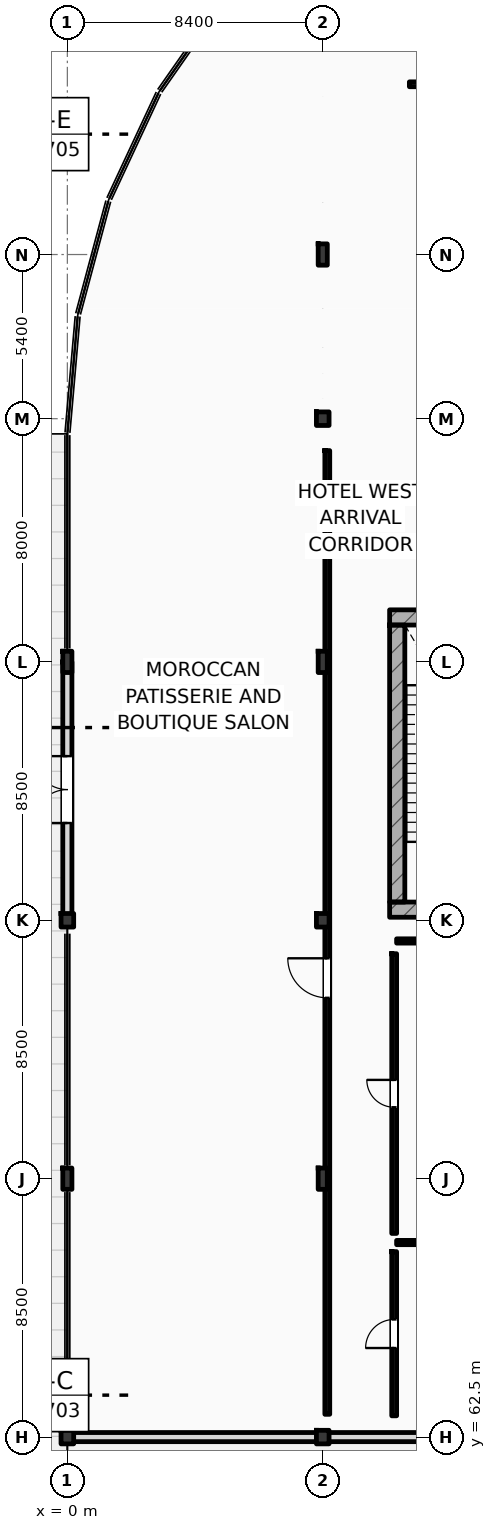
"""IFC4 building model, lengths in metres.
Left out: names, types, materials, properties, quantities, classifications, styles, units other than length and angle.
Written with IfcOpenShell. Run it as: python <this file> out.ifc"""

import sys

from ifc_helpers import new_model, si_unit, direction, frame, frame_2d, origin, origin_2d, place, context, subcontext, project, spatial, rectangle, i_section, extrude, element, fill, save


model = new_model("IFC4")
c1 = context("Model", 3, precision=1e-05, world=origin(), true_north=direction((0.0, 1.0)))
c2 = subcontext(c1, "Body", "Model", "MODEL_VIEW")
j1 = project(units=[si_unit("LENGTHUNIT", "METRE"), si_unit("PLANEANGLEUNIT", "RADIAN")], contexts=[c1])
p1 = place(None, origin())
s1 = spatial("IfcSite", under=j1, at=p1, CompositionType="ELEMENT")
p2 = place(p1, origin())
s2 = spatial("IfcBuilding", under=s1, at=p2, CompositionType="ELEMENT")
p3 = place(p2, origin())
s3 = spatial("IfcBuildingStorey", under=s2, at=p3, CompositionType="ELEMENT", Elevation=0.0)
p4 = place(p3, frame((0.0, 62.5, 0.0), z_axis=(0.0, 0.0, 1.0), x_axis=(1.0, 0.0, 0.0)))
e1 = element("IfcColumn", 1, at=p4, inside=s3, PredefinedType="COLUMN", context=c2, shape_type="SweptSolid", body=[
    extrude(i_section(OverallWidth=0.416, OverallDepth=0.446, WebThickness=0.036, FlangeThickness=0.048, FilletRadius=0.015, at=origin_2d()), origin(), (0.0, 0.0, 1.0), 6.0),
])
p5 = place(p3, frame((0.0, 71.0, 0.0), z_axis=(0.0, 0.0, 1.0), x_axis=(1.0, 0.0, 0.0)))
e2 = element("IfcColumn", 2, at=p5, inside=s3, PredefinedType="COLUMN", context=c2, shape_type="SweptSolid", body=[
    extrude(i_section(OverallWidth=0.3, OverallDepth=0.7, WebThickness=0.017, FlangeThickness=0.032, FilletRadius=0.027, at=origin_2d()), origin(), (0.0, 0.0, 1.0), 6.0),
])
p6 = place(p3, frame((0.0, 79.5, 0.0), z_axis=(0.0, 0.0, 1.0), x_axis=(1.0, 0.0, 0.0)))
e3 = element("IfcColumn", 3, at=p6, inside=s3, PredefinedType="COLUMN", context=c2, shape_type="SweptSolid", body=[
    extrude(i_section(OverallWidth=0.416, OverallDepth=0.446, WebThickness=0.036, FlangeThickness=0.048, FilletRadius=0.015, at=origin_2d()), origin(), (0.0, 0.0, 1.0), 6.0),
])
p7 = place(p3, frame((0.0, 88.0, 0.0), z_axis=(0.0, 0.0, 1.0), x_axis=(1.0, 0.0, 0.0)))
e4 = element("IfcColumn", 4, at=p7, inside=s3, PredefinedType="COLUMN", context=c2, shape_type="SweptSolid", body=[
    extrude(i_section(OverallWidth=0.3, OverallDepth=0.7, WebThickness=0.017, FlangeThickness=0.032, FilletRadius=0.027, at=origin_2d()), origin(), (0.0, 0.0, 1.0), 6.0),
])
p8 = place(p3, frame((8.4, 62.5, 0.0), z_axis=(0.0, 0.0, 1.0), x_axis=(1.0, 0.0, 0.0)))
e5 = element("IfcColumn", 5, at=p8, inside=s3, PredefinedType="COLUMN", context=c2, shape_type="SweptSolid", body=[
    extrude(i_section(OverallWidth=0.416, OverallDepth=0.446, WebThickness=0.036, FlangeThickness=0.048, FilletRadius=0.015, at=origin_2d()), origin(), (0.0, 0.0, 1.0), 6.0),
])
p9 = place(p3, frame((8.4, 71.0, 0.0), z_axis=(0.0, 0.0, 1.0), x_axis=(1.0, 0.0, 0.0)))
e6 = element("IfcColumn", 6, at=p9, inside=s3, PredefinedType="COLUMN", context=c2, shape_type="SweptSolid", body=[
    extrude(i_section(OverallWidth=0.3, OverallDepth=0.7, WebThickness=0.017, FlangeThickness=0.032, FilletRadius=0.027, at=origin_2d()), origin(), (0.0, 0.0, 1.0), 6.0),
])
p10 = place(p3, frame((8.4, 79.5, 0.0), z_axis=(0.0, 0.0, 1.0), x_axis=(1.0, 0.0, 0.0)))
e7 = element("IfcColumn", 7, at=p10, inside=s3, PredefinedType="COLUMN", context=c2, shape_type="SweptSolid", body=[
    extrude(i_section(OverallWidth=0.416, OverallDepth=0.446, WebThickness=0.036, FlangeThickness=0.048, FilletRadius=0.015, at=origin_2d()), origin(), (0.0, 0.0, 1.0), 6.0),
])
p11 = place(p3, frame((8.4, 88.0, 0.0), z_axis=(0.0, 0.0, 1.0), x_axis=(1.0, 0.0, 0.0)))
e8 = element("IfcColumn", 8, at=p11, inside=s3, PredefinedType="COLUMN", context=c2, shape_type="SweptSolid", body=[
    extrude(i_section(OverallWidth=0.3, OverallDepth=0.7, WebThickness=0.017, FlangeThickness=0.032, FilletRadius=0.027, at=origin_2d()), origin(), (0.0, 0.0, 1.0), 6.0),
])
p12 = place(p3, frame((8.4, 96.0, 0.0), z_axis=(0.0, 0.0, 1.0), x_axis=(1.0, 0.0, 0.0)))
e9 = element("IfcColumn", 9, at=p12, inside=s3, PredefinedType="COLUMN", context=c2, shape_type="SweptSolid", body=[
    extrude(i_section(OverallWidth=0.416, OverallDepth=0.446, WebThickness=0.036, FlangeThickness=0.048, FilletRadius=0.015, at=origin_2d()), origin(), (0.0, 0.0, 1.0), 6.0),
])
p13 = place(p3, frame((8.4, 101.4, 0.0), z_axis=(0.0, 0.0, 1.0), x_axis=(1.0, 0.0, 0.0)))
e10 = element("IfcColumn", 10, at=p13, inside=s3, PredefinedType="COLUMN", context=c2, shape_type="SweptSolid", body=[
    extrude(i_section(OverallWidth=0.3, OverallDepth=0.7, WebThickness=0.017, FlangeThickness=0.032, FilletRadius=0.027, at=origin_2d()), origin(), (0.0, 0.0, 1.0), 6.0),
])
for number, where, z_axis, x_axis in (
    (11, (10.6, 89.462, 0.0), (0.0, 0.0, 1.0), (1.0, 0.0, 0.0)),
    (12, (10.6, 79.85, 0.0), (0.0, 0.0, 1.0), (1.0, 0.0, 0.0)),
):
    element("IfcWall", number, at=place(p3, frame(where, z_axis=z_axis, x_axis=x_axis)), inside=s3, PredefinedType="SHEAR", context=c2, shape_type="SweptSolid", body=[
        extrude(rectangle(XDim=5.16, YDim=0.5, at=frame_2d((2.58, 0.0))), origin(), (0.0, 0.0, 1.0), 6.0),
    ])
p14 = place(p3, frame((10.85, 80.1, 0.0), z_axis=(0.0, 0.0, 1.0), x_axis=(0.0, 1.0, 0.0)))
e13 = element("IfcWall", 13, at=p14, inside=s3, PredefinedType="SHEAR", context=c2, shape_type="SweptSolid", body=[
    extrude(rectangle(XDim=9.112, YDim=0.5, at=frame_2d((4.556, 0.0))), origin(), (0.0, 0.0, 1.0), 6.0),
])
p15 = place(p3, frame((0.0, 79.5, 0.0), z_axis=(0.0, 0.0, 1.0), x_axis=(0.0, 1.0, 0.0)))
e14 = element("IfcWall", 14, at=p15, inside=s3, PredefinedType="STANDARD", context=c2, shape_type="SweptSolid", body=[
    extrude(rectangle(XDim=8.5, YDim=0.3, at=frame_2d((4.25, 0.0))), origin(), (0.0, 0.0, 1.0), 5.2),
])
p16 = place(p15, frame((3.2, 0.0, 0.0)))
e15 = element("IfcOpeningElement", 15, at=p16, cuts=e14, PredefinedType="OPENING", context=c2, shape_type="SweptSolid", body=[
    extrude(rectangle(XDim=2.2, YDim=2.5, at=frame_2d((1.1, 1.25))), frame((0.0, 0.16, 0.0), z_axis=(0.0, -1.0, 0.0), x_axis=(1.0, 0.0, 0.0)), (0.0, 0.0, 1.0), 0.32),
])
p17 = place(p3, frame((0.0, 62.5, 0.0), z_axis=(0.0, 0.0, 1.0), x_axis=(1.0, 0.0, 0.0)))
e16 = element("IfcWall", 16, at=p17, inside=s3, PredefinedType="STANDARD", context=c2, shape_type="SweptSolid", body=[
    extrude(rectangle(XDim=25.2, YDim=0.3, at=frame_2d((12.6, 0.0))), origin(), (0.0, 0.0, 1.0), 5.14),
])
p18 = place(p17, frame((20.35, 0.0, 0.0)))
e17 = element("IfcOpeningElement", 17, at=p18, cuts=e16, PredefinedType="OPENING", context=c2, shape_type="SweptSolid", body=[
    extrude(rectangle(XDim=2.1, YDim=2.4, at=frame_2d((1.05, 1.2))), frame((0.0, 0.16, 0.0), z_axis=(0.0, -1.0, 0.0), x_axis=(1.0, 0.0, 0.0)), (0.0, 0.0, 1.0), 0.32),
])
p19 = place(p3, frame((11.25, 107.0, 0.0), z_axis=(0.0, 0.0, 1.0), x_axis=(1.0, 0.0, 0.0)))
e18 = element("IfcWall", 18, at=p19, inside=s3, PredefinedType="PARTITIONING", context=c2, shape_type="SweptSolid", body=[
    extrude(rectangle(XDim=13.3, YDim=0.16, at=frame_2d((6.65, 0.0))), origin(), (0.0, 0.0, 1.0), 5.7),
])
p20 = place(p19, frame((6.0, 0.0, 0.0)))
e19 = element("IfcOpeningElement", 19, at=p20, cuts=e18, PredefinedType="OPENING", context=c2, shape_type="SweptSolid", body=[
    extrude(rectangle(XDim=1.3, YDim=2.2, at=frame_2d((0.65, 1.1))), frame((0.0, 0.09, 0.0), z_axis=(0.0, -1.0, 0.0), x_axis=(1.0, 0.0, 0.0)), (0.0, 0.0, 1.0), 0.18),
])
p21 = place(p3, frame((8.55, 63.25, 0.0), z_axis=(0.0, 0.0, 1.0), x_axis=(0.0, 1.0, 0.0)))
e20 = element("IfcWall", 20, at=p21, inside=s3, PredefinedType="PARTITIONING", context=c2, shape_type="SweptSolid", body=[
    extrude(rectangle(XDim=31.7, YDim=0.16, at=frame_2d((15.85, 0.0))), origin(), (0.0, 0.0, 1.0), 5.2),
])
p22 = place(p21, frame((13.7, 0.0, 0.0)))
e21 = element("IfcOpeningElement", 21, at=p22, cuts=e20, PredefinedType="OPENING", context=c2, shape_type="SweptSolid", body=[
    extrude(rectangle(XDim=1.3, YDim=2.2, at=frame_2d((0.65, 1.1))), frame((0.0, 0.09, 0.0), z_axis=(0.0, -1.0, 0.0), x_axis=(1.0, 0.0, 0.0)), (0.0, 0.0, 1.0), 0.18),
])
p23 = place(p3, frame((10.75, 63.2, 0.0), z_axis=(0.0, 0.0, 1.0), x_axis=(0.0, 1.0, 0.0)))
e22 = element("IfcWall", 22, at=p23, inside=s3, PredefinedType="PARTITIONING", context=c2, shape_type="SweptSolid", body=[
    extrude(rectangle(XDim=5.4, YDim=0.16, at=frame_2d((2.7, 0.0))), origin(), (0.0, 0.0, 1.0), 5.7),
])
p24 = place(p23, frame((2.23, 0.0, 0.0)))
e23 = element("IfcOpeningElement", 23, at=p24, cuts=e22, PredefinedType="OPENING", context=c2, shape_type="SweptSolid", body=[
    extrude(rectangle(XDim=0.94, YDim=2.15, at=frame_2d((0.47, 1.075))), frame((0.0, 0.09, 0.0), z_axis=(0.0, -1.0, 0.0), x_axis=(1.0, 0.0, 0.0)), (0.0, 0.0, 1.0), 0.18),
])
p25 = place(p3, frame((10.75, 69.2, 0.0), z_axis=(0.0, 0.0, 1.0), x_axis=(0.0, 1.0, 0.0)))
e24 = element("IfcWall", 24, at=p25, inside=s3, PredefinedType="PARTITIONING", context=c2, shape_type="SweptSolid", body=[
    extrude(rectangle(XDim=9.2, YDim=0.16, at=frame_2d((4.6, 0.0))), origin(), (0.0, 0.0, 1.0), 5.7),
])
p26 = place(p25, frame((4.15, 0.0, 0.0)))
e25 = element("IfcOpeningElement", 25, at=p26, cuts=e24, PredefinedType="OPENING", context=c2, shape_type="SweptSolid", body=[
    extrude(rectangle(XDim=0.9, YDim=2.1, at=frame_2d((0.45, 1.05))), frame((0.0, 0.09, 0.0), z_axis=(0.0, -1.0, 0.0), x_axis=(1.0, 0.0, 0.0)), (0.0, 0.0, 1.0), 0.18),
])
p27 = place(p3, frame((10.83, 68.9, 0.0), z_axis=(0.0, 0.0, 1.0), x_axis=(1.0, 0.0, 0.0)))
e26 = element("IfcWall", 26, at=p27, inside=s3, PredefinedType="PARTITIONING", context=c2, shape_type="SweptSolid", body=[
    extrude(rectangle(XDim=6.72, YDim=0.14, at=frame_2d((3.36, 0.0))), origin(), (0.0, 0.0, 1.0), 5.7),
])
p28 = place(p3, frame((10.83, 78.82, 0.0), z_axis=(0.0, 0.0, 1.0), x_axis=(1.0, 0.0, 0.0)))
e27 = element("IfcWall", 27, at=p28, inside=s3, PredefinedType="PARTITIONING", context=c2, shape_type="SweptSolid", body=[
    extrude(rectangle(XDim=6.86, YDim=0.14, at=frame_2d((3.43, 0.0))), origin(), (0.0, 0.0, 1.0), 5.7),
])
p29 = place(p16, origin())
e28 = element("IfcDoor", 28, at=p29, inside=s3, OperationType="DOUBLE_SWING_LEFT", PredefinedType="DOOR", context=c2, shape_type="SweptSolid", body=[
    extrude(rectangle(XDim=2.2, YDim=2.5, at=frame_2d((1.1, 1.25))), frame((0.0, 0.025, 0.0), z_axis=(0.0, -1.0, 0.0), x_axis=(1.0, 0.0, 0.0)), (0.0, 0.0, 1.0), 0.05),
])
fill(e15, e28)
p30 = place(p22, origin())
e29 = element("IfcDoor", 29, at=p30, inside=s3, OperationType="SINGLE_SWING_RIGHT", PredefinedType="DOOR", context=c2, shape_type="SweptSolid", body=[
    extrude(rectangle(XDim=1.3, YDim=2.2, at=frame_2d((0.65, 1.1))), frame((0.0, 0.025, 0.0), z_axis=(0.0, -1.0, 0.0), x_axis=(1.0, 0.0, 0.0)), (0.0, 0.0, 1.0), 0.05),
])
fill(e21, e29)
p31 = place(p24, origin())
e30 = element("IfcDoor", 30, at=p31, inside=s3, OperationType="SINGLE_SWING_LEFT", PredefinedType="DOOR", context=c2, shape_type="SweptSolid", body=[
    extrude(rectangle(XDim=0.94, YDim=2.15, at=frame_2d((0.47, 1.075))), frame((0.0, 0.025, 0.0), z_axis=(0.0, -1.0, 0.0), x_axis=(1.0, 0.0, 0.0)), (0.0, 0.0, 1.0), 0.05),
])
fill(e23, e30)
p32 = place(p26, origin())
e31 = element("IfcDoor", 31, at=p32, inside=s3, OperationType="SINGLE_SWING_RIGHT", PredefinedType="DOOR", context=c2, shape_type="SweptSolid", body=[
    extrude(rectangle(XDim=0.9, YDim=2.1, at=frame_2d((0.45, 1.05))), frame((0.0, 0.025, 0.0), z_axis=(0.0, -1.0, 0.0), x_axis=(1.0, 0.0, 0.0)), (0.0, 0.0, 1.0), 0.05),
])
fill(e25, e31)
save(model, sys.argv[1])
